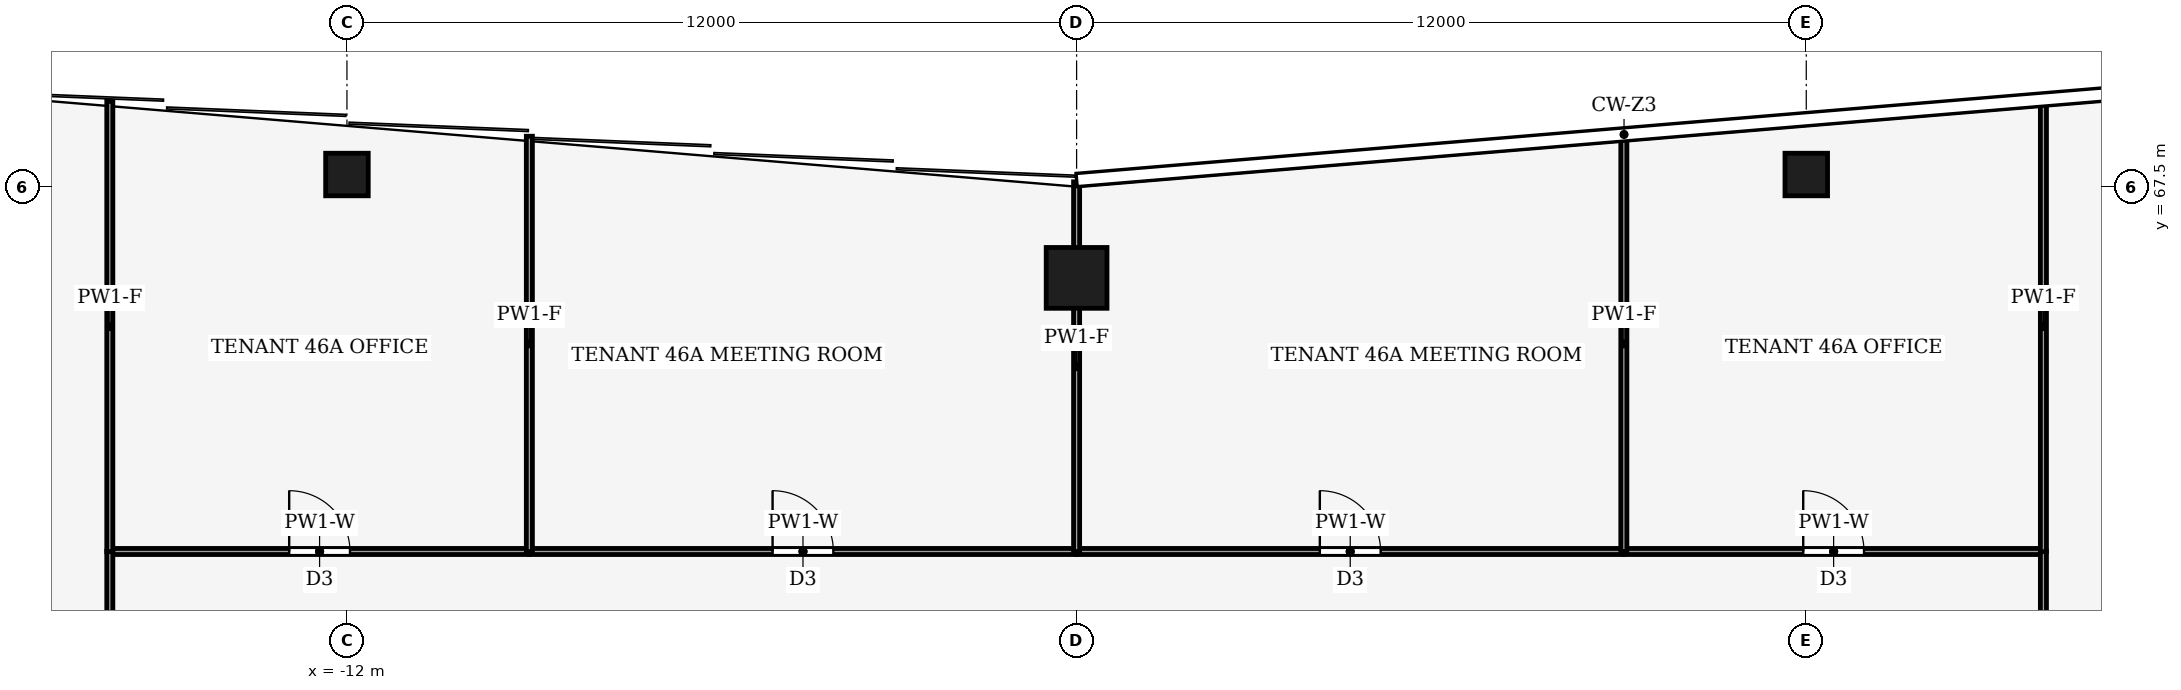
"""IFC4 building model, lengths in metres.
Left out: names, types, materials, properties, quantities, classifications, styles, units other than length and angle.
Written with IfcOpenShell. Run it as: python <this file> out.ifc"""

import sys

from ifc_helpers import new_model, si_unit, direction, frame, frame_2d, origin, origin_2d, place, context, subcontext, project, spatial, rectangle, hollow_rectangle, extrude, element, fill, save


model = new_model("IFC4")
c1 = context("Model", 3, precision=1e-05, world=origin(), true_north=direction((0.0, 1.0)))
c2 = subcontext(c1, "Body", "Model", "MODEL_VIEW")
j1 = project(units=[si_unit("LENGTHUNIT", "METRE"), si_unit("PLANEANGLEUNIT", "RADIAN")], contexts=[c1])
p1 = place(None, origin())
s1 = spatial("IfcSite", under=j1, at=p1, CompositionType="ELEMENT")
p2 = place(p1, origin())
s2 = spatial("IfcBuilding", under=s1, at=p2, CompositionType="ELEMENT")
p3 = place(p2, frame((0.0, 0.0, 202.0)))
s3 = spatial("IfcBuildingStorey", under=s2, at=p3, CompositionType="ELEMENT", Elevation=202.0)
p4 = place(p3, frame((0.0, 66.0, 0.0), z_axis=(0.0, 0.0, 1.0), x_axis=(1.0, 0.0, 0.0)))
e1 = element("IfcColumn", 1, at=p4, inside=s3, PredefinedType="COLUMN", context=c2, shape_type="SweptSolid", body=[
    extrude(hollow_rectangle(XDim=1.0, YDim=1.0, WallThickness=0.06, at=origin_2d()), origin(), (0.0, 0.0, 1.0), 4.0),
])
for number, where, z_axis, x_axis in (
    (2, (-12.0, 67.7, 0.0), (0.0, 0.0, 1.0), (1.0, 0.0, 0.0)),
    (3, (12.0, 67.7, 0.0), (0.0, 0.0, 1.0), (1.0, 0.0, 0.0)),
):
    element("IfcColumn", number, at=place(p3, frame(where, z_axis=z_axis, x_axis=x_axis)), inside=s3, PredefinedType="COLUMN", context=c2, shape_type="SweptSolid", body=[
        extrude(hollow_rectangle(XDim=0.7, YDim=0.7, WallThickness=0.03, at=origin_2d()), origin(), (0.0, 0.0, 1.0), 4.0),
    ])
p5 = place(p3, frame((-15.9, 61.5, 0.0), z_axis=(0.0, 0.0, 1.0), x_axis=(1.0, 0.0, 0.0)))
e4 = element("IfcWall", 4, at=p5, inside=s3, PredefinedType="PARTITIONING", context=c2, shape_type="SweptSolid", body=[
    extrude(rectangle(XDim=6.9, YDim=0.1, at=frame_2d((3.45, 0.0))), origin(), (0.0, 0.0, 1.0), 3.24),
])
p6 = place(p5, frame((2.95, 0.0, 0.0)))
e5 = element("IfcOpeningElement", 5, at=p6, cuts=e4, PredefinedType="OPENING", context=c2, shape_type="SweptSolid", body=[
    extrude(rectangle(XDim=1.0, YDim=2.1, at=frame_2d((0.5, 1.05))), frame((0.0, 0.06, 0.0), z_axis=(0.0, -1.0, 0.0), x_axis=(1.0, 0.0, 0.0)), (0.0, 0.0, 1.0), 0.12),
])
p7 = place(p3, frame((-9.0, 61.5, 0.0), z_axis=(0.0, 0.0, 1.0), x_axis=(1.0, 0.0, 0.0)))
e6 = element("IfcWall", 6, at=p7, inside=s3, PredefinedType="PARTITIONING", context=c2, shape_type="SweptSolid", body=[
    extrude(rectangle(XDim=9.0, YDim=0.1, at=frame_2d((4.5, 0.0))), origin(), (0.0, 0.0, 1.0), 3.24),
])
p8 = place(p7, frame((4.0, 0.0, 0.0)))
e7 = element("IfcOpeningElement", 7, at=p8, cuts=e6, PredefinedType="OPENING", context=c2, shape_type="SweptSolid", body=[
    extrude(rectangle(XDim=1.0, YDim=2.1, at=frame_2d((0.5, 1.05))), frame((0.0, 0.06, 0.0), z_axis=(0.0, -1.0, 0.0), x_axis=(1.0, 0.0, 0.0)), (0.0, 0.0, 1.0), 0.12),
])
p9 = place(p3, frame((0.0, 61.5, 0.0), z_axis=(0.0, 0.0, 1.0), x_axis=(1.0, 0.0, 0.0)))
e8 = element("IfcWall", 8, at=p9, inside=s3, PredefinedType="PARTITIONING", context=c2, shape_type="SweptSolid", body=[
    extrude(rectangle(XDim=9.0, YDim=0.1, at=frame_2d((4.5, 0.0))), origin(), (0.0, 0.0, 1.0), 3.24),
])
p10 = place(p9, frame((4.0, 0.0, 0.0)))
e9 = element("IfcOpeningElement", 9, at=p10, cuts=e8, PredefinedType="OPENING", context=c2, shape_type="SweptSolid", body=[
    extrude(rectangle(XDim=1.0, YDim=2.1, at=frame_2d((0.5, 1.05))), frame((0.0, 0.06, 0.0), z_axis=(0.0, -1.0, 0.0), x_axis=(1.0, 0.0, 0.0)), (0.0, 0.0, 1.0), 0.12),
])
p11 = place(p3, frame((9.0, 61.5, 0.0), z_axis=(0.0, 0.0, 1.0), x_axis=(1.0, 0.0, 0.0)))
e10 = element("IfcWall", 10, at=p11, inside=s3, PredefinedType="PARTITIONING", context=c2, shape_type="SweptSolid", body=[
    extrude(rectangle(XDim=6.9, YDim=0.1, at=frame_2d((3.45, 0.0))), origin(), (0.0, 0.0, 1.0), 3.24),
])
p12 = place(p11, frame((2.95, 0.0, 0.0)))
e11 = element("IfcOpeningElement", 11, at=p12, cuts=e10, PredefinedType="OPENING", context=c2, shape_type="SweptSolid", body=[
    extrude(rectangle(XDim=1.0, YDim=2.1, at=frame_2d((0.5, 1.05))), frame((0.0, 0.06, 0.0), z_axis=(0.0, -1.0, 0.0), x_axis=(1.0, 0.0, 0.0)), (0.0, 0.0, 1.0), 0.12),
])
for number, where, z_axis, x_axis in (
    (12, (-15.9, 61.504, 0.0), (0.0, 0.0, 1.0), (0.0, -1.0, 0.0)),
    (13, (15.9, 46.496, 0.0), (0.0, 0.0, 1.0), (0.0, 1.0, 0.0)),
):
    element("IfcWall", number, at=place(p3, frame(where, z_axis=z_axis, x_axis=x_axis)), inside=s3, PredefinedType="PARTITIONING", context=c2, shape_type="SweptSolid", body=[
        extrude(rectangle(XDim=15.008, YDim=0.1, at=frame_2d((7.504, 0.0))), origin(), (0.0, 0.0, 1.0), 3.24),
    ])
p13 = place(p3, frame((-9.0, 61.5, 0.0), z_axis=(0.0, 0.0, 1.0), x_axis=(0.0, 1.0, 0.0)))
e14 = element("IfcWall", 14, at=p13, inside=s3, PredefinedType="PARTITIONING", context=c2, shape_type="SweptSolid", body=[
    extrude(rectangle(XDim=6.83, YDim=0.1, at=frame_2d((3.415, 0.0))), origin(), (0.0, 0.0, 1.0), 3.04),
])
p14 = place(p3, frame((-15.9, 68.905, 0.0), z_axis=(0.0, 0.0, 1.0), x_axis=(0.0, -1.0, 0.0)))
e15 = element("IfcWall", 15, at=p14, inside=s3, PredefinedType="PARTITIONING", context=c2, shape_type="SweptSolid", body=[
    extrude(rectangle(XDim=7.409, YDim=0.1, at=frame_2d((3.705, 0.0))), origin(), (0.0, 0.0, 1.0), 3.04),
])
p15 = place(p3, frame((0.0, 61.5, 0.0), z_axis=(0.0, 0.0, 1.0), x_axis=(0.0, 1.0, 0.0)))
e16 = element("IfcWall", 16, at=p15, inside=s3, PredefinedType="PARTITIONING", context=c2, shape_type="SweptSolid", body=[
    extrude(rectangle(XDim=6.08, YDim=0.1, at=frame_2d((3.04, 0.0))), origin(), (0.0, 0.0, 1.0), 3.04),
])
p16 = place(p3, frame((9.0, 61.5, 0.0), z_axis=(0.0, 0.0, 1.0), x_axis=(0.0, 1.0, 0.0)))
e17 = element("IfcWall", 17, at=p16, inside=s3, PredefinedType="PARTITIONING", context=c2, shape_type="SweptSolid", body=[
    extrude(rectangle(XDim=6.83, YDim=0.1, at=frame_2d((3.415, 0.0))), origin(), (0.0, 0.0, 1.0), 3.04),
])
p17 = place(p3, frame((15.9, 61.496, 0.0), z_axis=(0.0, 0.0, 1.0), x_axis=(0.0, 1.0, 0.0)))
e18 = element("IfcWall", 18, at=p17, inside=s3, PredefinedType="PARTITIONING", context=c2, shape_type="SweptSolid", body=[
    extrude(rectangle(XDim=7.409, YDim=0.1, at=frame_2d((3.705, 0.0))), origin(), (0.0, 0.0, 1.0), 3.04),
])
p18 = place(p6, origin())
e19 = element("IfcDoor", 19, at=p18, inside=s3, OperationType="SINGLE_SWING_LEFT", PredefinedType="DOOR", context=c2, shape_type="SweptSolid", body=[
    extrude(rectangle(XDim=1.0, YDim=2.1, at=frame_2d((0.5, 1.05))), frame((0.0, 0.025, 0.0), z_axis=(0.0, -1.0, 0.0), x_axis=(1.0, 0.0, 0.0)), (0.0, 0.0, 1.0), 0.05),
])
fill(e5, e19)
p19 = place(p8, origin())
e20 = element("IfcDoor", 20, at=p19, inside=s3, OperationType="SINGLE_SWING_RIGHT", PredefinedType="DOOR", context=c2, shape_type="SweptSolid", body=[
    extrude(rectangle(XDim=1.0, YDim=2.1, at=frame_2d((0.5, 1.05))), frame((0.0, 0.025, 0.0), z_axis=(0.0, -1.0, 0.0), x_axis=(1.0, 0.0, 0.0)), (0.0, 0.0, 1.0), 0.05),
])
fill(e7, e20)
p20 = place(p10, origin())
e21 = element("IfcDoor", 21, at=p20, inside=s3, OperationType="SINGLE_SWING_LEFT", PredefinedType="DOOR", context=c2, shape_type="SweptSolid", body=[
    extrude(rectangle(XDim=1.0, YDim=2.1, at=frame_2d((0.5, 1.05))), frame((0.0, 0.025, 0.0), z_axis=(0.0, -1.0, 0.0), x_axis=(1.0, 0.0, 0.0)), (0.0, 0.0, 1.0), 0.05),
])
fill(e9, e21)
p21 = place(p12, origin())
e22 = element("IfcDoor", 22, at=p21, inside=s3, OperationType="SINGLE_SWING_RIGHT", PredefinedType="DOOR", context=c2, shape_type="SweptSolid", body=[
    extrude(rectangle(XDim=1.0, YDim=2.1, at=frame_2d((0.5, 1.05))), frame((0.0, 0.025, 0.0), z_axis=(0.0, -1.0, 0.0), x_axis=(1.0, 0.0, 0.0)), (0.0, 0.0, 1.0), 0.05),
])
fill(e11, e22)
save(model, sys.argv[1])
